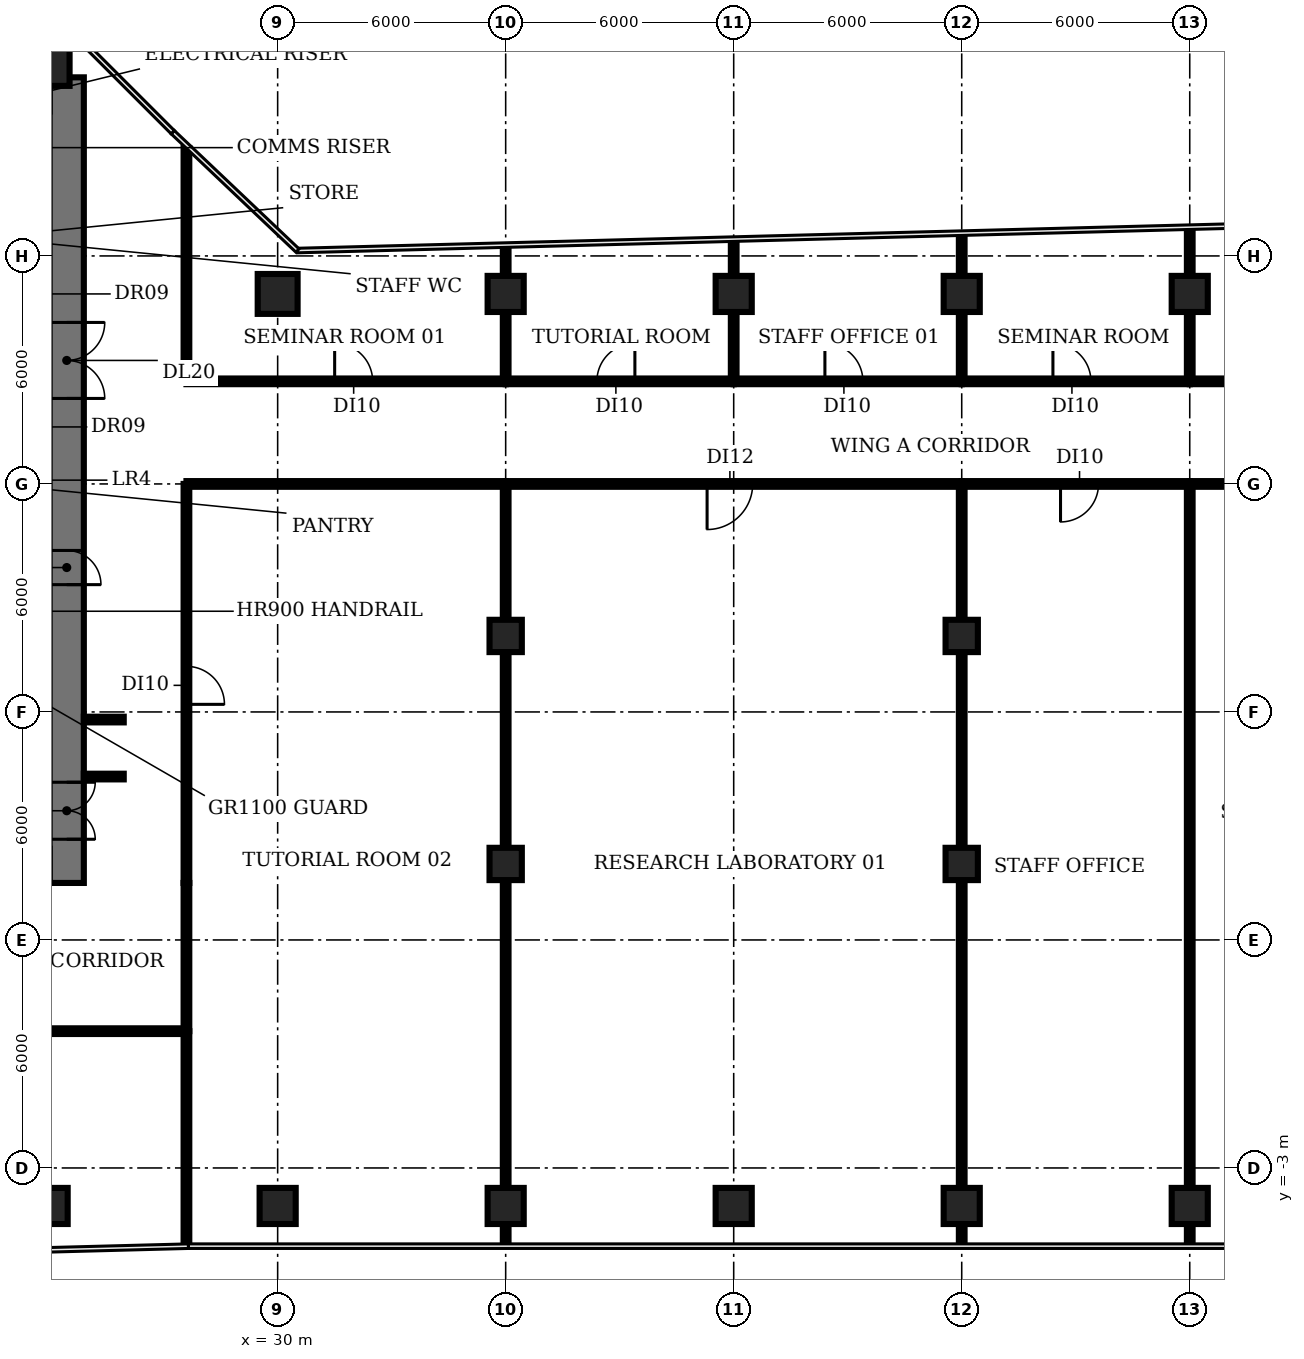
"""IFC4 building model, lengths in metres.
Left out: names, types, materials, properties, quantities, classifications, styles, units other than length and angle.
Written with IfcOpenShell. Run it as: python <this file> out.ifc"""

import sys

from ifc_helpers import new_model, si_unit, direction, frame, frame_2d, origin, origin_2d, place, context, subcontext, project, spatial, rectangle, circle, extrude, element, fill, save


model = new_model("IFC4")
c1 = context("Model", 3, precision=1e-05, world=origin(), true_north=direction((0.0, 1.0)))
c2 = subcontext(c1, "Body", "Model", "MODEL_VIEW")
j1 = project(units=[si_unit("LENGTHUNIT", "METRE"), si_unit("PLANEANGLEUNIT", "RADIAN")], contexts=[c1])
p1 = place(None, origin())
s1 = spatial("IfcSite", under=j1, at=p1, CompositionType="ELEMENT")
p2 = place(p1, origin())
s2 = spatial("IfcBuilding", under=s1, at=p2, CompositionType="ELEMENT")
p3 = place(p2, frame((0.0, 0.0, 58.4)))
s3 = spatial("IfcBuildingStorey", under=s2, at=p3, CompositionType="ELEMENT", Elevation=58.4)
p4 = place(p3, frame((24.0, -4.0, 0.0), z_axis=(0.0, 0.0, 1.0), x_axis=(1.0, 0.0, 0.0)))
e1 = element("IfcColumn", 1, at=p4, inside=s3, PredefinedType="COLUMN", context=c2, shape_type="SweptSolid", body=[
    extrude(rectangle(XDim=0.95, YDim=0.95, at=origin_2d()), origin(), (0.0, 0.0, 1.0), 3.85),
])
p5 = place(p3, frame((24.0, 26.0, 0.0), z_axis=(0.0, 0.0, 1.0), x_axis=(1.0, 0.0, 0.0)))
e2 = element("IfcColumn", 2, at=p5, inside=s3, PredefinedType="COLUMN", context=c2, shape_type="SweptSolid", body=[
    extrude(circle(Radius=0.525, at=origin_2d()), origin(), (0.0, 0.0, 1.0), 3.85),
])
p6 = place(p3, frame((30.0, -4.0, 0.0), z_axis=(0.0, 0.0, 1.0), x_axis=(1.0, 0.0, 0.0)))
e3 = element("IfcColumn", 3, at=p6, inside=s3, PredefinedType="COLUMN", context=c2, shape_type="SweptSolid", body=[
    extrude(rectangle(XDim=0.95, YDim=0.95, at=origin_2d()), origin(), (0.0, 0.0, 1.0), 3.85),
])
p7 = place(p3, frame((30.0, 20.0, 0.0), z_axis=(0.0, 0.0, 1.0), x_axis=(1.0, 0.0, 0.0)))
e4 = element("IfcColumn", 4, at=p7, inside=s3, PredefinedType="COLUMN", context=c2, shape_type="SweptSolid", body=[
    extrude(circle(Radius=0.525, at=origin_2d()), origin(), (0.0, 0.0, 1.0), 3.85),
])
p8 = place(p3, frame((36.0, -4.0, 0.0), z_axis=(0.0, 0.0, 1.0), x_axis=(1.0, 0.0, 0.0)))
e5 = element("IfcColumn", 5, at=p8, inside=s3, PredefinedType="COLUMN", context=c2, shape_type="SweptSolid", body=[
    extrude(rectangle(XDim=0.95, YDim=0.95, at=origin_2d()), origin(), (0.0, 0.0, 1.0), 3.85),
])
for number, where, z_axis, x_axis in (
    (6, (36.0, 5.0, 0.0), (0.0, 0.0, 1.0), (1.0, 0.0, 0.0)),
    (7, (36.0, 11.0, 0.0), (0.0, 0.0, 1.0), (1.0, 0.0, 0.0)),
):
    element("IfcColumn", number, at=place(p3, frame(where, z_axis=z_axis, x_axis=x_axis)), inside=s3, PredefinedType="COLUMN", context=c2, shape_type="SweptSolid", body=[
        extrude(rectangle(XDim=0.85, YDim=0.85, at=origin_2d()), origin(), (0.0, 0.0, 1.0), 3.85),
    ])
for number, where, z_axis, x_axis in (
    (8, (36.0, 20.0, 0.0), (0.0, 0.0, 1.0), (1.0, 0.0, 0.0)),
    (9, (42.0, -4.0, 0.0), (0.0, 0.0, 1.0), (1.0, 0.0, 0.0)),
    (10, (42.0, 20.0, 0.0), (0.0, 0.0, 1.0), (1.0, 0.0, 0.0)),
    (11, (48.0, -4.0, 0.0), (0.0, 0.0, 1.0), (1.0, 0.0, 0.0)),
):
    element("IfcColumn", number, at=place(p3, frame(where, z_axis=z_axis, x_axis=x_axis)), inside=s3, PredefinedType="COLUMN", context=c2, shape_type="SweptSolid", body=[
        extrude(rectangle(XDim=0.95, YDim=0.95, at=origin_2d()), origin(), (0.0, 0.0, 1.0), 3.85),
    ])
for number, where, z_axis, x_axis in (
    (12, (48.0, 5.0, 0.0), (0.0, 0.0, 1.0), (1.0, 0.0, 0.0)),
    (13, (48.0, 11.0, 0.0), (0.0, 0.0, 1.0), (1.0, 0.0, 0.0)),
):
    element("IfcColumn", number, at=place(p3, frame(where, z_axis=z_axis, x_axis=x_axis)), inside=s3, PredefinedType="COLUMN", context=c2, shape_type="SweptSolid", body=[
        extrude(rectangle(XDim=0.85, YDim=0.85, at=origin_2d()), origin(), (0.0, 0.0, 1.0), 3.85),
    ])
for number, where, z_axis, x_axis in (
    (14, (48.0, 20.0, 0.0), (0.0, 0.0, 1.0), (1.0, 0.0, 0.0)),
    (15, (54.0, -4.0, 0.0), (0.0, 0.0, 1.0), (1.0, 0.0, 0.0)),
    (16, (54.0, 20.0, 0.0), (0.0, 0.0, 1.0), (1.0, 0.0, 0.0)),
):
    element("IfcColumn", number, at=place(p3, frame(where, z_axis=z_axis, x_axis=x_axis)), inside=s3, PredefinedType="COLUMN", context=c2, shape_type="SweptSolid", body=[
        extrude(rectangle(XDim=0.95, YDim=0.95, at=origin_2d()), origin(), (0.0, 0.0, 1.0), 3.85),
    ])
p9 = place(p3, frame((24.45, 25.7, 0.0), z_axis=(0.0, 0.0, 1.0), x_axis=(0.0, -1.0, 0.0)))
e17 = element("IfcWall", 17, at=p9, inside=s3, PredefinedType="SHEAR", context=c2, shape_type="SweptSolid", body=[
    extrude(rectangle(XDim=21.2, YDim=0.9, at=frame_2d((10.6, 0.0))), origin(), (0.0, 0.0, 1.0), 3.85),
])
p10 = place(p9, frame((18.55, 0.0, 0.0)))
e18 = element("IfcOpeningElement", 18, at=p10, cuts=e17, PredefinedType="OPENING", context=c2, shape_type="SweptSolid", body=[
    extrude(rectangle(XDim=1.5, YDim=2.1, at=frame_2d((0.75, 1.05))), frame((0.0, 0.46, 0.0), z_axis=(0.0, -1.0, 0.0), x_axis=(1.0, 0.0, 0.0)), (0.0, 0.0, 1.0), 0.92),
])
p11 = place(p9, frame((12.45, 0.0, 0.0)))
e19 = element("IfcOpeningElement", 19, at=p11, cuts=e17, PredefinedType="OPENING", context=c2, shape_type="SweptSolid", body=[
    extrude(rectangle(XDim=0.9, YDim=2.1, at=frame_2d((0.45, 1.05))), frame((0.0, 0.46, 0.0), z_axis=(0.0, -1.0, 0.0), x_axis=(1.0, 0.0, 0.0)), (0.0, 0.0, 1.0), 0.92),
])
p12 = place(p9, frame((6.45, 0.0, 0.0)))
e20 = element("IfcOpeningElement", 20, at=p12, cuts=e17, PredefinedType="OPENING", context=c2, shape_type="SweptSolid", body=[
    extrude(rectangle(XDim=2.0, YDim=2.1, at=frame_2d((1.0, 1.05))), frame((0.0, 0.46, 0.0), z_axis=(0.0, -1.0, 0.0), x_axis=(1.0, 0.0, 0.0)), (0.0, 0.0, 1.0), 0.92),
])
for number, where, z_axis, x_axis in (
    (21, (24.9, 7.3, 0.0), (0.0, 0.0, 1.0), (1.0, 0.0, 0.0)),
    (22, (24.9, 8.8, 0.0), (0.0, 0.0, 1.0), (1.0, 0.0, 0.0)),
):
    element("IfcWall", number, at=place(p3, frame(where, z_axis=z_axis, x_axis=x_axis)), inside=s3, PredefinedType="PARTITIONING", context=c2, shape_type="SweptSolid", body=[
        extrude(rectangle(XDim=1.05, YDim=0.15, at=frame_2d((0.525, 0.0))), origin(), (0.0, 0.0, 1.0), 2.83),
    ])
p13 = place(p3, frame((27.6, -4.993, 0.0), z_axis=(0.0, 0.0, 1.0), x_axis=(0.0, 1.0, 0.0)))
e23 = element("IfcWall", 23, at=p13, inside=s3, PredefinedType="PARTITIONING", context=c2, shape_type="SweptSolid", body=[
    extrude(rectangle(XDim=5.593, YDim=0.15, at=frame_2d((2.796, 0.0))), origin(), (0.0, 0.0, 1.0), 2.83),
])
p14 = place(p3, frame((27.6, 0.6, 0.0), z_axis=(0.0, 0.0, 1.0), x_axis=(-1.0, 0.0, 0.0)))
e24 = element("IfcWall", 24, at=p14, inside=s3, PredefinedType="PARTITIONING", context=c2, shape_type="SweptSolid", body=[
    extrude(rectangle(XDim=25.2, YDim=0.15, at=frame_2d((12.6, 0.0))), origin(), (0.0, 0.0, 1.0), 2.83),
])
p15 = place(p14, frame((12.1, 0.0, 0.0)))
e25 = element("IfcOpeningElement", 25, at=p15, cuts=e24, PredefinedType="OPENING", context=c2, shape_type="SweptSolid", body=[
    extrude(rectangle(XDim=1.2, YDim=2.1, at=frame_2d((0.6, 1.05))), frame((0.0, 0.085, 0.0), z_axis=(0.0, -1.0, 0.0), x_axis=(1.0, 0.0, 0.0)), (0.0, 0.0, 1.0), 0.17),
])
p16 = place(p3, frame((27.6, 0.6, 0.0), z_axis=(0.0, 0.0, 1.0), x_axis=(0.0, 1.0, 0.0)))
e26 = element("IfcWall", 26, at=p16, inside=s3, PredefinedType="PARTITIONING", context=c2, shape_type="SweptSolid", body=[
    extrude(rectangle(XDim=3.9, YDim=0.15, at=frame_2d((1.95, 0.0))), origin(), (0.0, 0.0, 1.0), 2.83),
])
p17 = place(p3, frame((27.6, 15.0, 0.0), z_axis=(0.0, 0.0, 1.0), x_axis=(0.0, -1.0, 0.0)))
e27 = element("IfcWall", 27, at=p17, inside=s3, PredefinedType="PARTITIONING", context=c2, shape_type="SweptSolid", body=[
    extrude(rectangle(XDim=10.5, YDim=0.15, at=frame_2d((5.25, 0.0))), origin(), (0.0, 0.0, 1.0), 2.83),
])
p18 = place(p17, frame((4.8, 0.0, 0.0)))
e28 = element("IfcOpeningElement", 28, at=p18, cuts=e27, PredefinedType="OPENING", context=c2, shape_type="SweptSolid", body=[
    extrude(rectangle(XDim=1.0, YDim=2.1, at=frame_2d((0.5, 1.05))), frame((0.0, 0.085, 0.0), z_axis=(0.0, -1.0, 0.0), x_axis=(1.0, 0.0, 0.0)), (0.0, 0.0, 1.0), 0.17),
])
p19 = place(p3, frame((27.6, 15.0, 0.0), z_axis=(0.0, 0.0, 1.0), x_axis=(1.0, 0.0, 0.0)))
e29 = element("IfcWall", 29, at=p19, inside=s3, PredefinedType="PARTITIONING", context=c2, shape_type="SweptSolid", body=[
    extrude(rectangle(XDim=8.4, YDim=0.15, at=frame_2d((4.2, 0.0))), origin(), (0.0, 0.0, 1.0), 2.83),
])
p20 = place(p3, frame((27.6, 17.7, 0.0), z_axis=(0.0, 0.0, 1.0), x_axis=(0.0, 1.0, 0.0)))
e30 = element("IfcWall", 30, at=p20, inside=s3, PredefinedType="PARTITIONING", context=c2, shape_type="SweptSolid", body=[
    extrude(rectangle(XDim=6.14, YDim=0.15, at=frame_2d((3.07, 0.0))), origin(), (0.0, 0.0, 1.0), 2.83),
])
p21 = place(p3, frame((27.6, 17.7, 0.0), z_axis=(0.0, 0.0, 1.0), x_axis=(1.0, 0.0, 0.0)))
e31 = element("IfcWall", 31, at=p21, inside=s3, PredefinedType="PARTITIONING", context=c2, shape_type="SweptSolid", body=[
    extrude(rectangle(XDim=8.4, YDim=0.15, at=frame_2d((4.2, 0.0))), origin(), (0.0, 0.0, 1.0), 2.83),
])
p22 = place(p21, frame((3.9, 0.0, 0.0)))
e32 = element("IfcOpeningElement", 32, at=p22, cuts=e31, PredefinedType="OPENING", context=c2, shape_type="SweptSolid", body=[
    extrude(rectangle(XDim=1.0, YDim=2.1, at=frame_2d((0.5, 1.05))), frame((0.0, 0.085, 0.0), z_axis=(0.0, -1.0, 0.0), x_axis=(1.0, 0.0, 0.0)), (0.0, 0.0, 1.0), 0.17),
])
p23 = place(p3, frame((36.0, -5.01, 0.0), z_axis=(0.0, 0.0, 1.0), x_axis=(0.0, 1.0, 0.0)))
e33 = element("IfcWall", 33, at=p23, inside=s3, PredefinedType="PARTITIONING", context=c2, shape_type="SweptSolid", body=[
    extrude(rectangle(XDim=20.01, YDim=0.15, at=frame_2d((10.005, 0.0))), origin(), (0.0, 0.0, 1.0), 2.83),
])
p24 = place(p3, frame((36.0, 17.7, 0.0), z_axis=(0.0, 0.0, 1.0), x_axis=(0.0, 1.0, 0.0)))
e34 = element("IfcWall", 34, at=p24, inside=s3, PredefinedType="PARTITIONING", context=c2, shape_type="SweptSolid", body=[
    extrude(rectangle(XDim=3.54, YDim=0.15, at=frame_2d((1.77, 0.0))), origin(), (0.0, 0.0, 1.0), 2.83),
])
p25 = place(p3, frame((36.0, 17.7, 0.0), z_axis=(0.0, 0.0, 1.0), x_axis=(1.0, 0.0, 0.0)))
e35 = element("IfcWall", 35, at=p25, inside=s3, PredefinedType="PARTITIONING", context=c2, shape_type="SweptSolid", body=[
    extrude(rectangle(XDim=6.0, YDim=0.15, at=frame_2d((3.0, 0.0))), origin(), (0.0, 0.0, 1.0), 2.83),
])
p26 = place(p25, frame((2.4, 0.0, 0.0)))
e36 = element("IfcOpeningElement", 36, at=p26, cuts=e35, PredefinedType="OPENING", context=c2, shape_type="SweptSolid", body=[
    extrude(rectangle(XDim=1.0, YDim=2.1, at=frame_2d((0.5, 1.05))), frame((0.0, 0.085, 0.0), z_axis=(0.0, -1.0, 0.0), x_axis=(1.0, 0.0, 0.0)), (0.0, 0.0, 1.0), 0.17),
])
p27 = place(p3, frame((42.0, 17.7, 0.0), z_axis=(0.0, 0.0, 1.0), x_axis=(0.0, 1.0, 0.0)))
e37 = element("IfcWall", 37, at=p27, inside=s3, PredefinedType="PARTITIONING", context=c2, shape_type="SweptSolid", body=[
    extrude(rectangle(XDim=3.69, YDim=0.15, at=frame_2d((1.845, 0.0))), origin(), (0.0, 0.0, 1.0), 2.83),
])
p28 = place(p3, frame((42.0, 17.7, 0.0), z_axis=(0.0, 0.0, 1.0), x_axis=(1.0, 0.0, 0.0)))
e38 = element("IfcWall", 38, at=p28, inside=s3, PredefinedType="PARTITIONING", context=c2, shape_type="SweptSolid", body=[
    extrude(rectangle(XDim=6.0, YDim=0.15, at=frame_2d((3.0, 0.0))), origin(), (0.0, 0.0, 1.0), 2.83),
])
p29 = place(p28, frame((2.4, 0.0, 0.0)))
e39 = element("IfcOpeningElement", 39, at=p29, cuts=e38, PredefinedType="OPENING", context=c2, shape_type="SweptSolid", body=[
    extrude(rectangle(XDim=1.0, YDim=2.1, at=frame_2d((0.5, 1.05))), frame((0.0, 0.085, 0.0), z_axis=(0.0, -1.0, 0.0), x_axis=(1.0, 0.0, 0.0)), (0.0, 0.0, 1.0), 0.17),
])
p30 = place(p3, frame((48.0, -5.01, 0.0), z_axis=(0.0, 0.0, 1.0), x_axis=(0.0, 1.0, 0.0)))
e40 = element("IfcWall", 40, at=p30, inside=s3, PredefinedType="PARTITIONING", context=c2, shape_type="SweptSolid", body=[
    extrude(rectangle(XDim=20.01, YDim=0.15, at=frame_2d((10.005, 0.0))), origin(), (0.0, 0.0, 1.0), 2.83),
])
p31 = place(p3, frame((48.0, 15.0, 0.0), z_axis=(0.0, 0.0, 1.0), x_axis=(-1.0, 0.0, 0.0)))
e41 = element("IfcWall", 41, at=p31, inside=s3, PredefinedType="PARTITIONING", context=c2, shape_type="SweptSolid", body=[
    extrude(rectangle(XDim=12.0, YDim=0.15, at=frame_2d((6.0, 0.0))), origin(), (0.0, 0.0, 1.0), 2.83),
])
p32 = place(p31, frame((5.5, 0.0, 0.0)))
e42 = element("IfcOpeningElement", 42, at=p32, cuts=e41, PredefinedType="OPENING", context=c2, shape_type="SweptSolid", body=[
    extrude(rectangle(XDim=1.2, YDim=2.1, at=frame_2d((0.6, 1.05))), frame((0.0, 0.085, 0.0), z_axis=(0.0, -1.0, 0.0), x_axis=(1.0, 0.0, 0.0)), (0.0, 0.0, 1.0), 0.17),
])
p33 = place(p3, frame((48.0, 17.7, 0.0), z_axis=(0.0, 0.0, 1.0), x_axis=(0.0, 1.0, 0.0)))
e43 = element("IfcWall", 43, at=p33, inside=s3, PredefinedType="PARTITIONING", context=c2, shape_type="SweptSolid", body=[
    extrude(rectangle(XDim=3.85, YDim=0.15, at=frame_2d((1.925, 0.0))), origin(), (0.0, 0.0, 1.0), 2.83),
])
p34 = place(p3, frame((48.0, 17.7, 0.0), z_axis=(0.0, 0.0, 1.0), x_axis=(1.0, 0.0, 0.0)))
e44 = element("IfcWall", 44, at=p34, inside=s3, PredefinedType="PARTITIONING", context=c2, shape_type="SweptSolid", body=[
    extrude(rectangle(XDim=6.0, YDim=0.15, at=frame_2d((3.0, 0.0))), origin(), (0.0, 0.0, 1.0), 2.83),
])
p35 = place(p34, frame((2.4, 0.0, 0.0)))
e45 = element("IfcOpeningElement", 45, at=p35, cuts=e44, PredefinedType="OPENING", context=c2, shape_type="SweptSolid", body=[
    extrude(rectangle(XDim=1.0, YDim=2.1, at=frame_2d((0.5, 1.05))), frame((0.0, 0.085, 0.0), z_axis=(0.0, -1.0, 0.0), x_axis=(1.0, 0.0, 0.0)), (0.0, 0.0, 1.0), 0.17),
])
p36 = place(p3, frame((54.0, -4.993, 0.0), z_axis=(0.0, 0.0, 1.0), x_axis=(0.0, 1.0, 0.0)))
e46 = element("IfcWall", 46, at=p36, inside=s3, PredefinedType="PARTITIONING", context=c2, shape_type="SweptSolid", body=[
    extrude(rectangle(XDim=19.993, YDim=0.15, at=frame_2d((9.997, 0.0))), origin(), (0.0, 0.0, 1.0), 2.83),
])
p37 = place(p3, frame((54.0, 15.0, 0.0), z_axis=(0.0, 0.0, 1.0), x_axis=(-1.0, 0.0, 0.0)))
e47 = element("IfcWall", 47, at=p37, inside=s3, PredefinedType="PARTITIONING", context=c2, shape_type="SweptSolid", body=[
    extrude(rectangle(XDim=6.0, YDim=0.15, at=frame_2d((3.0, 0.0))), origin(), (0.0, 0.0, 1.0), 2.83),
])
p38 = place(p37, frame((2.4, 0.0, 0.0)))
e48 = element("IfcOpeningElement", 48, at=p38, cuts=e47, PredefinedType="OPENING", context=c2, shape_type="SweptSolid", body=[
    extrude(rectangle(XDim=1.0, YDim=2.1, at=frame_2d((0.5, 1.05))), frame((0.0, 0.085, 0.0), z_axis=(0.0, -1.0, 0.0), x_axis=(1.0, 0.0, 0.0)), (0.0, 0.0, 1.0), 0.17),
])
p39 = place(p3, frame((54.0, 17.7, 0.0), z_axis=(0.0, 0.0, 1.0), x_axis=(0.0, 1.0, 0.0)))
e49 = element("IfcWall", 49, at=p39, inside=s3, PredefinedType="PARTITIONING", context=c2, shape_type="SweptSolid", body=[
    extrude(rectangle(XDim=4.01, YDim=0.15, at=frame_2d((2.005, 0.0))), origin(), (0.0, 0.0, 1.0), 2.83),
])
p40 = place(p3, frame((54.0, 17.7, 0.0), z_axis=(0.0, 0.0, 1.0), x_axis=(1.0, 0.0, 0.0)))
e50 = element("IfcWall", 50, at=p40, inside=s3, PredefinedType="PARTITIONING", context=c2, shape_type="SweptSolid", body=[
    extrude(rectangle(XDim=10.89, YDim=0.15, at=frame_2d((5.445, 0.0))), origin(), (0.0, 0.0, 1.0), 2.83),
])
p41 = place(p40, frame((3.39, 0.0, 0.0)))
e51 = element("IfcOpeningElement", 51, at=p41, cuts=e50, PredefinedType="OPENING", context=c2, shape_type="SweptSolid", body=[
    extrude(rectangle(XDim=1.0, YDim=2.1, at=frame_2d((0.5, 1.05))), frame((0.0, 0.085, 0.0), z_axis=(0.0, -1.0, 0.0), x_axis=(1.0, 0.0, 0.0)), (0.0, 0.0, 1.0), 0.17),
])
p42 = place(p3, frame((60.0, 15.0, 0.0), z_axis=(0.0, 0.0, 1.0), x_axis=(-1.0, 0.0, 0.0)))
e52 = element("IfcWall", 52, at=p42, inside=s3, PredefinedType="PARTITIONING", context=c2, shape_type="SweptSolid", body=[
    extrude(rectangle(XDim=6.0, YDim=0.15, at=frame_2d((3.0, 0.0))), origin(), (0.0, 0.0, 1.0), 2.83),
])
p43 = place(p42, frame((2.4, 0.0, 0.0)))
e53 = element("IfcOpeningElement", 53, at=p43, cuts=e52, PredefinedType="OPENING", context=c2, shape_type="SweptSolid", body=[
    extrude(rectangle(XDim=1.0, YDim=2.1, at=frame_2d((0.5, 1.05))), frame((0.0, 0.085, 0.0), z_axis=(0.0, -1.0, 0.0), x_axis=(1.0, 0.0, 0.0)), (0.0, 0.0, 1.0), 0.17),
])
p44 = place(p10, origin())
e54 = element("IfcDoor", 54, at=p44, inside=s3, OperationType="DOUBLE_DOOR_SINGLE_SWING", PredefinedType="DOOR", context=c2, shape_type="SweptSolid", body=[
    extrude(rectangle(XDim=1.5, YDim=2.1, at=frame_2d((0.75, 1.05))), frame((0.0, 0.025, 0.0), z_axis=(0.0, -1.0, 0.0), x_axis=(1.0, 0.0, 0.0)), (0.0, 0.0, 1.0), 0.05),
])
fill(e18, e54)
p45 = place(p12, origin())
e55 = element("IfcDoor", 55, at=p45, inside=s3, OperationType="DOUBLE_DOOR_SINGLE_SWING", PredefinedType="DOOR", context=c2, shape_type="SweptSolid", body=[
    extrude(rectangle(XDim=2.0, YDim=2.1, at=frame_2d((1.0, 1.05))), frame((0.0, 0.025, 0.0), z_axis=(0.0, -1.0, 0.0), x_axis=(1.0, 0.0, 0.0)), (0.0, 0.0, 1.0), 0.05),
])
fill(e20, e55)
p46 = place(p18, origin())
e56 = element("IfcDoor", 56, at=p46, inside=s3, OperationType="SINGLE_SWING_RIGHT", PredefinedType="DOOR", context=c2, shape_type="SweptSolid", body=[
    extrude(rectangle(XDim=1.0, YDim=2.1, at=frame_2d((0.5, 1.05))), frame((0.0, 0.025, 0.0), z_axis=(0.0, -1.0, 0.0), x_axis=(1.0, 0.0, 0.0)), (0.0, 0.0, 1.0), 0.05),
])
fill(e28, e56)
p47 = place(p22, origin())
e57 = element("IfcDoor", 57, at=p47, inside=s3, OperationType="SINGLE_SWING_LEFT", PredefinedType="DOOR", context=c2, shape_type="SweptSolid", body=[
    extrude(rectangle(XDim=1.0, YDim=2.1, at=frame_2d((0.5, 1.05))), frame((0.0, 0.025, 0.0), z_axis=(0.0, -1.0, 0.0), x_axis=(1.0, 0.0, 0.0)), (0.0, 0.0, 1.0), 0.05),
])
fill(e32, e57)
p48 = place(p26, origin())
e58 = element("IfcDoor", 58, at=p48, inside=s3, OperationType="SINGLE_SWING_RIGHT", PredefinedType="DOOR", context=c2, shape_type="SweptSolid", body=[
    extrude(rectangle(XDim=1.0, YDim=2.1, at=frame_2d((0.5, 1.05))), frame((0.0, 0.025, 0.0), z_axis=(0.0, -1.0, 0.0), x_axis=(1.0, 0.0, 0.0)), (0.0, 0.0, 1.0), 0.05),
])
fill(e36, e58)
p49 = place(p29, origin())
e59 = element("IfcDoor", 59, at=p49, inside=s3, OperationType="SINGLE_SWING_LEFT", PredefinedType="DOOR", context=c2, shape_type="SweptSolid", body=[
    extrude(rectangle(XDim=1.0, YDim=2.1, at=frame_2d((0.5, 1.05))), frame((0.0, 0.025, 0.0), z_axis=(0.0, -1.0, 0.0), x_axis=(1.0, 0.0, 0.0)), (0.0, 0.0, 1.0), 0.05),
])
fill(e39, e59)
p50 = place(p32, origin())
e60 = element("IfcDoor", 60, at=p50, inside=s3, OperationType="SINGLE_SWING_RIGHT", PredefinedType="DOOR", context=c2, shape_type="SweptSolid", body=[
    extrude(rectangle(XDim=1.2, YDim=2.1, at=frame_2d((0.6, 1.05))), frame((0.0, 0.025, 0.0), z_axis=(0.0, -1.0, 0.0), x_axis=(1.0, 0.0, 0.0)), (0.0, 0.0, 1.0), 0.05),
])
fill(e42, e60)
p51 = place(p35, origin())
e61 = element("IfcDoor", 61, at=p51, inside=s3, OperationType="SINGLE_SWING_LEFT", PredefinedType="DOOR", context=c2, shape_type="SweptSolid", body=[
    extrude(rectangle(XDim=1.0, YDim=2.1, at=frame_2d((0.5, 1.05))), frame((0.0, 0.025, 0.0), z_axis=(0.0, -1.0, 0.0), x_axis=(1.0, 0.0, 0.0)), (0.0, 0.0, 1.0), 0.05),
])
fill(e45, e61)
p52 = place(p38, origin())
e62 = element("IfcDoor", 62, at=p52, inside=s3, OperationType="SINGLE_SWING_RIGHT", PredefinedType="DOOR", context=c2, shape_type="SweptSolid", body=[
    extrude(rectangle(XDim=1.0, YDim=2.1, at=frame_2d((0.5, 1.05))), frame((0.0, 0.025, 0.0), z_axis=(0.0, -1.0, 0.0), x_axis=(1.0, 0.0, 0.0)), (0.0, 0.0, 1.0), 0.05),
])
fill(e48, e62)
save(model, sys.argv[1])
